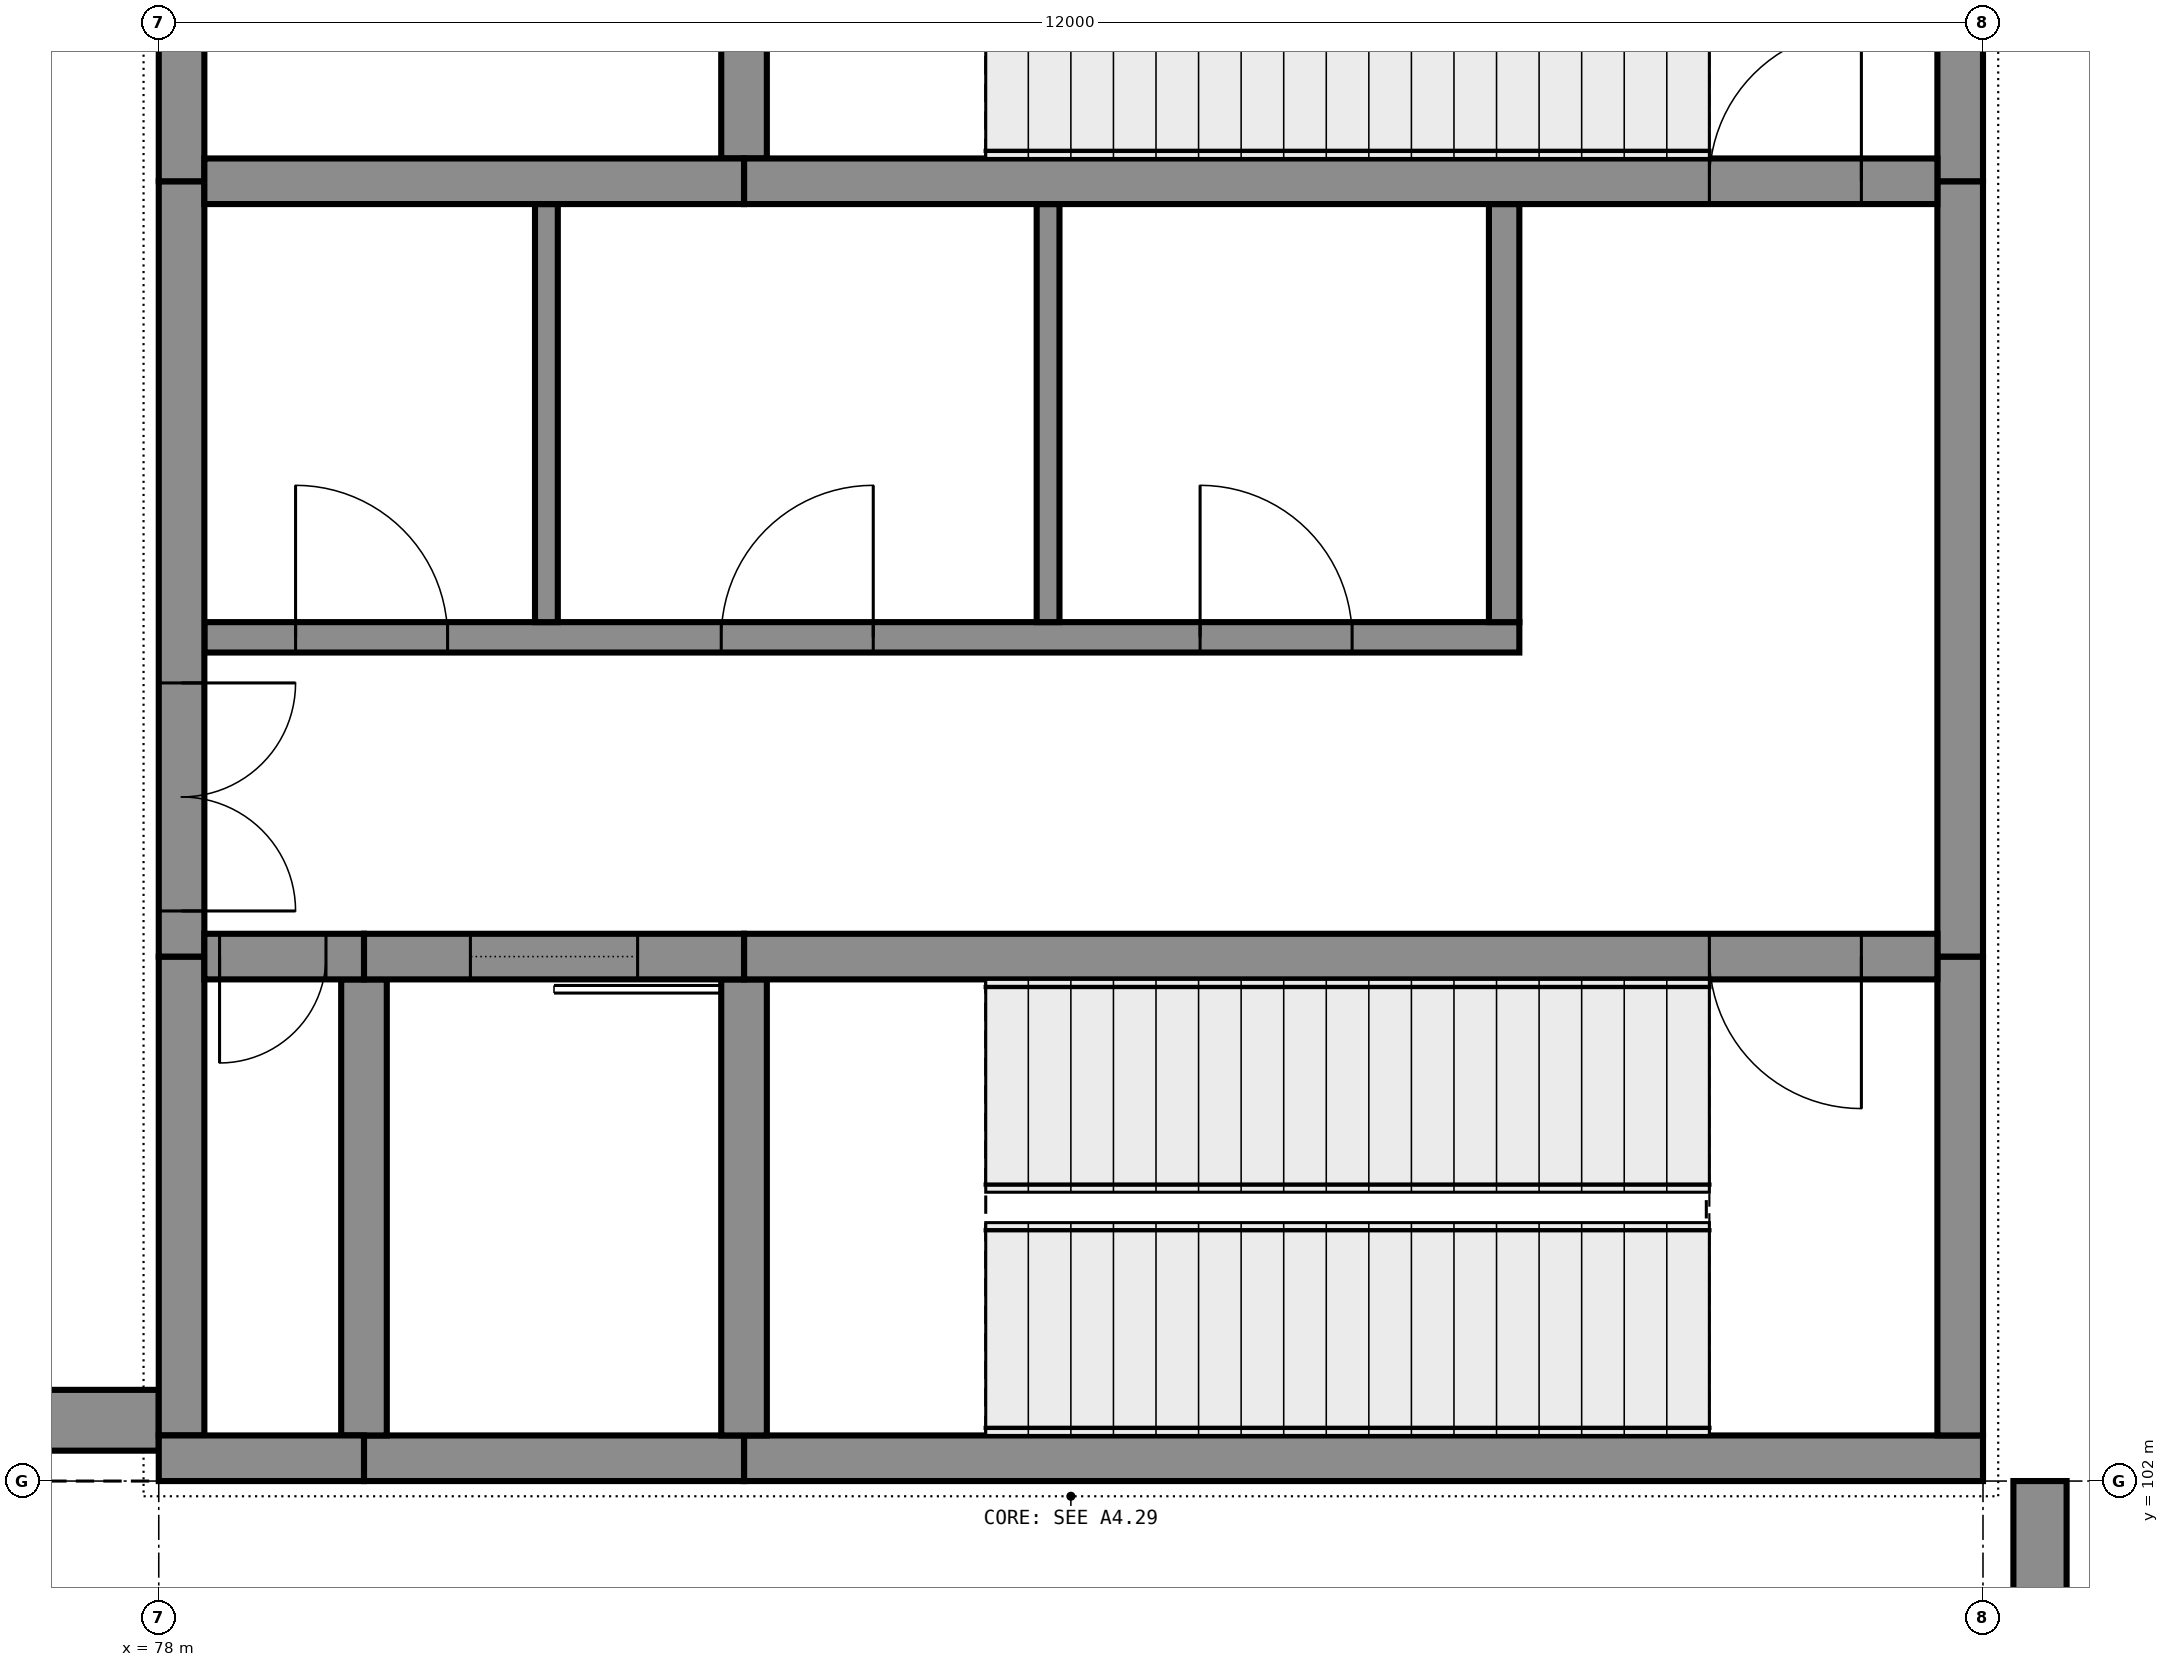
"""IFC4 building model, lengths in metres.
Left out: names, types, materials, properties, quantities, classifications, styles, units other than length and angle.
Written with IfcOpenShell. Run it as: python <this file> out.ifc"""

import sys

from ifc_helpers import new_model, si_unit, direction, frame, frame_2d, origin, place, context, subcontext, project, spatial, rectangle, extrude, element, fill, save


model = new_model("IFC4")
c1 = context("Model", 3, precision=1e-05, world=origin(), true_north=direction((0.0, 1.0)))
c2 = subcontext(c1, "Body", "Model", "MODEL_VIEW")
j1 = project(units=[si_unit("LENGTHUNIT", "METRE"), si_unit("PLANEANGLEUNIT", "RADIAN")], contexts=[c1])
p1 = place(None, origin())
s1 = spatial("IfcSite", under=j1, at=p1, CompositionType="ELEMENT")
p2 = place(p1, origin())
s2 = spatial("IfcBuilding", under=s1, at=p2, CompositionType="ELEMENT")
p3 = place(p2, frame((0.0, 0.0, 6.0)))
s3 = spatial("IfcBuildingStorey", under=s2, at=p3, CompositionType="ELEMENT", Elevation=6.0)
p4 = place(p3, frame((90.0, 102.15, 0.0), z_axis=(0.0, 0.0, 1.0), x_axis=(-1.0, 0.0, 0.0)))
e1 = element("IfcWall", 1, at=p4, inside=s3, PredefinedType="SHEAR", context=c2, shape_type="SweptSolid", body=[
    extrude(rectangle(XDim=8.15, YDim=0.3, at=frame_2d((4.075, 0.0))), origin(), (0.0, 0.0, 1.0), 5.75),
])
p5 = place(p3, frame((81.85, 102.15, 0.0), z_axis=(0.0, 0.0, 1.0), x_axis=(-1.0, 0.0, 0.0)))
e2 = element("IfcWall", 2, at=p5, inside=s3, PredefinedType="SHEAR", context=c2, shape_type="SweptSolid", body=[
    extrude(rectangle(XDim=2.5, YDim=0.3, at=frame_2d((1.25, 0.0))), origin(), (0.0, 0.0, 1.0), 5.75),
])
p6 = place(p3, frame((79.35, 102.15, 0.0), z_axis=(0.0, 0.0, 1.0), x_axis=(-1.0, 0.0, 0.0)))
e3 = element("IfcWall", 3, at=p6, inside=s3, PredefinedType="SHEAR", context=c2, shape_type="SweptSolid", body=[
    extrude(rectangle(XDim=1.35, YDim=0.3, at=frame_2d((0.675, 0.0))), origin(), (0.0, 0.0, 1.0), 5.75),
])
p7 = place(p3, frame((89.7, 105.45, 0.0), z_axis=(0.0, 0.0, 1.0), x_axis=(-1.0, 0.0, 0.0)))
e4 = element("IfcWall", 4, at=p7, inside=s3, PredefinedType="SHEAR", context=c2, shape_type="SweptSolid", body=[
    extrude(rectangle(XDim=7.85, YDim=0.3, at=frame_2d((3.925, 0.0))), origin(), (0.0, 0.0, 1.0), 5.75),
])
p8 = place(p7, frame((0.5, 0.0, 0.0)))
e5 = element("IfcOpeningElement", 5, at=p8, cuts=e4, PredefinedType="OPENING", context=c2, shape_type="SweptSolid", body=[
    extrude(rectangle(XDim=1.0, YDim=2.1, at=frame_2d((0.5, 1.05))), frame((0.0, 0.16, 0.0), z_axis=(0.0, -1.0, 0.0), x_axis=(1.0, 0.0, 0.0)), (0.0, 0.0, 1.0), 0.32),
])
p9 = place(p3, frame((81.85, 105.45, 0.0), z_axis=(0.0, 0.0, 1.0), x_axis=(-1.0, 0.0, 0.0)))
e6 = element("IfcWall", 6, at=p9, inside=s3, PredefinedType="SHEAR", context=c2, shape_type="SweptSolid", body=[
    extrude(rectangle(XDim=2.5, YDim=0.3, at=frame_2d((1.25, 0.0))), origin(), (0.0, 0.0, 1.0), 5.75),
])
p10 = place(p9, frame((0.7, 0.0, 0.0)))
e7 = element("IfcOpeningElement", 7, at=p10, cuts=e6, PredefinedType="OPENING", context=c2, shape_type="SweptSolid", body=[
    extrude(rectangle(XDim=1.1, YDim=2.1, at=frame_2d((0.55, 1.05))), frame((0.0, 0.16, 0.0), z_axis=(0.0, -1.0, 0.0), x_axis=(1.0, 0.0, 0.0)), (0.0, 0.0, 1.0), 0.32),
])
p11 = place(p3, frame((79.35, 105.45, 0.0), z_axis=(0.0, 0.0, 1.0), x_axis=(-1.0, 0.0, 0.0)))
e8 = element("IfcWall", 8, at=p11, inside=s3, PredefinedType="SHEAR", context=c2, shape_type="SweptSolid", body=[
    extrude(rectangle(XDim=1.05, YDim=0.3, at=frame_2d((0.525, 0.0))), origin(), (0.0, 0.0, 1.0), 5.75),
])
p12 = place(p11, frame((0.25, 0.0, 0.0)))
e9 = element("IfcOpeningElement", 9, at=p12, cuts=e8, PredefinedType="OPENING", context=c2, shape_type="SweptSolid", body=[
    extrude(rectangle(XDim=0.7, YDim=2.1, at=frame_2d((0.35, 1.05))), frame((0.0, 0.16, 0.0), z_axis=(0.0, -1.0, 0.0), x_axis=(1.0, 0.0, 0.0)), (0.0, 0.0, 1.0), 0.32),
])
p13 = place(p3, frame((89.7, 110.55, 0.0), z_axis=(0.0, 0.0, 1.0), x_axis=(-1.0, 0.0, 0.0)))
e10 = element("IfcWall", 10, at=p13, inside=s3, PredefinedType="SHEAR", context=c2, shape_type="SweptSolid", body=[
    extrude(rectangle(XDim=7.85, YDim=0.3, at=frame_2d((3.925, 0.0))), origin(), (0.0, 0.0, 1.0), 5.75),
])
p14 = place(p13, frame((0.5, 0.0, 0.0)))
e11 = element("IfcOpeningElement", 11, at=p14, cuts=e10, PredefinedType="OPENING", context=c2, shape_type="SweptSolid", body=[
    extrude(rectangle(XDim=1.0, YDim=2.1, at=frame_2d((0.5, 1.05))), frame((0.0, 0.16, 0.0), z_axis=(0.0, -1.0, 0.0), x_axis=(1.0, 0.0, 0.0)), (0.0, 0.0, 1.0), 0.32),
])
p15 = place(p3, frame((81.85, 110.55, 0.0), z_axis=(0.0, 0.0, 1.0), x_axis=(-1.0, 0.0, 0.0)))
e12 = element("IfcWall", 12, at=p15, inside=s3, PredefinedType="SHEAR", context=c2, shape_type="SweptSolid", body=[
    extrude(rectangle(XDim=3.55, YDim=0.3, at=frame_2d((1.775, 0.0))), origin(), (0.0, 0.0, 1.0), 5.75),
])
p16 = place(p3, frame((89.85, 102.3, 0.0), z_axis=(0.0, 0.0, 1.0), x_axis=(0.0, 1.0, 0.0)))
e13 = element("IfcWall", 13, at=p16, inside=s3, PredefinedType="SHEAR", context=c2, shape_type="SweptSolid", body=[
    extrude(rectangle(XDim=3.15, YDim=0.3, at=frame_2d((1.575, 0.0))), origin(), (0.0, 0.0, 1.0), 5.75),
])
p17 = place(p3, frame((89.85, 105.45, 0.0), z_axis=(0.0, 0.0, 1.0), x_axis=(0.0, 1.0, 0.0)))
e14 = element("IfcWall", 14, at=p17, inside=s3, PredefinedType="SHEAR", context=c2, shape_type="SweptSolid", body=[
    extrude(rectangle(XDim=5.1, YDim=0.3, at=frame_2d((2.55, 0.0))), origin(), (0.0, 0.0, 1.0), 5.75),
])
p18 = place(p3, frame((89.85, 110.55, 0.0), z_axis=(0.0, 0.0, 1.0), x_axis=(0.0, 1.0, 0.0)))
e15 = element("IfcWall", 15, at=p18, inside=s3, PredefinedType="SHEAR", context=c2, shape_type="SweptSolid", body=[
    extrude(rectangle(XDim=3.45, YDim=0.3, at=frame_2d((1.725, 0.0))), origin(), (0.0, 0.0, 1.0), 5.75),
])
p19 = place(p3, frame((78.15, 102.3, 0.0), z_axis=(0.0, 0.0, 1.0), x_axis=(0.0, 1.0, 0.0)))
e16 = element("IfcWall", 16, at=p19, inside=s3, PredefinedType="SHEAR", context=c2, shape_type="SweptSolid", body=[
    extrude(rectangle(XDim=3.15, YDim=0.3, at=frame_2d((1.575, 0.0))), origin(), (0.0, 0.0, 1.0), 5.75),
])
p20 = place(p3, frame((78.15, 105.45, 0.0), z_axis=(0.0, 0.0, 1.0), x_axis=(0.0, 1.0, 0.0)))
e17 = element("IfcWall", 17, at=p20, inside=s3, PredefinedType="SHEAR", context=c2, shape_type="SweptSolid", body=[
    extrude(rectangle(XDim=5.1, YDim=0.3, at=frame_2d((2.55, 0.0))), origin(), (0.0, 0.0, 1.0), 5.75),
])
p21 = place(p20, frame((0.3, 0.0, 0.0)))
e18 = element("IfcOpeningElement", 18, at=p21, cuts=e17, PredefinedType="OPENING", context=c2, shape_type="SweptSolid", body=[
    extrude(rectangle(XDim=1.5, YDim=2.1, at=frame_2d((0.75, 1.05))), frame((0.0, 0.16, 0.0), z_axis=(0.0, -1.0, 0.0), x_axis=(1.0, 0.0, 0.0)), (0.0, 0.0, 1.0), 0.32),
])
p22 = place(p3, frame((78.15, 110.55, 0.0), z_axis=(0.0, 0.0, 1.0), x_axis=(0.0, 1.0, 0.0)))
e19 = element("IfcWall", 19, at=p22, inside=s3, PredefinedType="SHEAR", context=c2, shape_type="SweptSolid", body=[
    extrude(rectangle(XDim=3.15, YDim=0.3, at=frame_2d((1.575, 0.0))), origin(), (0.0, 0.0, 1.0), 5.75),
])
p23 = place(p22, frame((1.15, 0.0, 0.0)))
e20 = element("IfcOpeningElement", 20, at=p23, cuts=e19, PredefinedType="OPENING", context=c2, shape_type="SweptSolid", body=[
    extrude(rectangle(XDim=1.0, YDim=2.1, at=frame_2d((0.5, 1.05))), frame((0.0, 0.16, 0.0), z_axis=(0.0, -1.0, 0.0), x_axis=(1.0, 0.0, 0.0)), (0.0, 0.0, 1.0), 0.32),
])
p24 = place(p3, frame((81.85, 102.3, 0.0), z_axis=(0.0, 0.0, 1.0), x_axis=(0.0, 1.0, 0.0)))
e21 = element("IfcWall", 21, at=p24, inside=s3, PredefinedType="SHEAR", context=c2, shape_type="SweptSolid", body=[
    extrude(rectangle(XDim=3.0, YDim=0.3, at=frame_2d((1.5, 0.0))), origin(), (0.0, 0.0, 1.0), 5.75),
])
p25 = place(p3, frame((81.85, 110.7, 0.0), z_axis=(0.0, 0.0, 1.0), x_axis=(0.0, 1.0, 0.0)))
e22 = element("IfcWall", 22, at=p25, inside=s3, PredefinedType="SHEAR", context=c2, shape_type="SweptSolid", body=[
    extrude(rectangle(XDim=3.3, YDim=0.3, at=frame_2d((1.65, 0.0))), origin(), (0.0, 0.0, 1.0), 5.75),
])
p26 = place(p3, frame((79.35, 102.3, 0.0), z_axis=(0.0, 0.0, 1.0), x_axis=(0.0, 1.0, 0.0)))
e23 = element("IfcWall", 23, at=p26, inside=s3, PredefinedType="SHEAR", context=c2, shape_type="SweptSolid", body=[
    extrude(rectangle(XDim=3.0, YDim=0.3, at=frame_2d((1.5, 0.0))), origin(), (0.0, 0.0, 1.0), 5.75),
])
p27 = place(p3, frame((90.375, 90.5, 0.0), z_axis=(0.0, 0.0, 1.0), x_axis=(0.0, 1.0, 0.0)))
e24 = element("IfcWall", 24, at=p27, inside=s3, PredefinedType="STANDARD", context=c2, shape_type="SweptSolid", body=[
    extrude(rectangle(XDim=11.5, YDim=0.35, at=frame_2d((5.75, 0.0))), origin(), (0.0, 0.0, 1.0), 6.0),
])
p28 = place(p3, frame((66.5, 102.4, 0.0), z_axis=(0.0, 0.0, 1.0), x_axis=(1.0, 0.0, 0.0)))
e25 = element("IfcWall", 25, at=p28, inside=s3, PredefinedType="SOLIDWALL", context=c2, shape_type="SweptSolid", body=[
    extrude(rectangle(XDim=11.5, YDim=0.4, at=frame_2d((5.75, 0.0))), origin(), (0.0, 0.0, 1.0), 6.0),
])
p29 = place(p3, frame((78.3, 107.55, 0.0), z_axis=(0.0, 0.0, 1.0), x_axis=(1.0, 0.0, 0.0)))
e26 = element("IfcWall", 26, at=p29, inside=s3, PredefinedType="PARTITIONING", context=c2, shape_type="SweptSolid", body=[
    extrude(rectangle(XDim=8.65, YDim=0.2, at=frame_2d((4.325, 0.0))), origin(), (0.0, 0.0, 1.0), 5.75),
])
p30 = place(p29, frame((0.6, 0.0, 0.0)))
e27 = element("IfcOpeningElement", 27, at=p30, cuts=e26, PredefinedType="OPENING", context=c2, shape_type="SweptSolid", body=[
    extrude(rectangle(XDim=1.0, YDim=2.1, at=frame_2d((0.5, 1.05))), frame((0.0, 0.11, 0.0), z_axis=(0.0, -1.0, 0.0), x_axis=(1.0, 0.0, 0.0)), (0.0, 0.0, 1.0), 0.22),
])
p31 = place(p29, frame((3.4, 0.0, 0.0)))
e28 = element("IfcOpeningElement", 28, at=p31, cuts=e26, PredefinedType="OPENING", context=c2, shape_type="SweptSolid", body=[
    extrude(rectangle(XDim=1.0, YDim=2.1, at=frame_2d((0.5, 1.05))), frame((0.0, 0.11, 0.0), z_axis=(0.0, -1.0, 0.0), x_axis=(1.0, 0.0, 0.0)), (0.0, 0.0, 1.0), 0.22),
])
p32 = place(p29, frame((6.55, 0.0, 0.0)))
e29 = element("IfcOpeningElement", 29, at=p32, cuts=e26, PredefinedType="OPENING", context=c2, shape_type="SweptSolid", body=[
    extrude(rectangle(XDim=1.0, YDim=2.1, at=frame_2d((0.5, 1.05))), frame((0.0, 0.11, 0.0), z_axis=(0.0, -1.0, 0.0), x_axis=(1.0, 0.0, 0.0)), (0.0, 0.0, 1.0), 0.22),
])
for number, where, z_axis, x_axis in (
    (30, (80.55, 107.65, 0.0), (0.0, 0.0, 1.0), (0.0, 1.0, 0.0)),
    (31, (83.85, 107.65, 0.0), (0.0, 0.0, 1.0), (0.0, 1.0, 0.0)),
):
    element("IfcWall", number, at=place(p3, frame(where, z_axis=z_axis, x_axis=x_axis)), inside=s3, PredefinedType="PARTITIONING", context=c2, shape_type="SweptSolid", body=[
        extrude(rectangle(XDim=2.75, YDim=0.15, at=frame_2d((1.375, 0.0))), origin(), (0.0, 0.0, 1.0), 5.75),
    ])
p33 = place(p3, frame((86.85, 107.65, 0.0), z_axis=(0.0, 0.0, 1.0), x_axis=(0.0, 1.0, 0.0)))
e32 = element("IfcWall", 32, at=p33, inside=s3, PredefinedType="PARTITIONING", context=c2, shape_type="SweptSolid", body=[
    extrude(rectangle(XDim=2.75, YDim=0.2, at=frame_2d((1.375, 0.0))), origin(), (0.0, 0.0, 1.0), 5.75),
])
p34 = place(p12, origin())
e33 = element("IfcDoor", 33, at=p34, inside=s3, OperationType="SINGLE_SWING_LEFT", PredefinedType="DOOR", context=c2, shape_type="SweptSolid", body=[
    extrude(rectangle(XDim=0.7, YDim=2.1, at=frame_2d((0.35, 1.05))), frame((0.0, 0.025, 0.0), z_axis=(0.0, -1.0, 0.0), x_axis=(1.0, 0.0, 0.0)), (0.0, 0.0, 1.0), 0.05),
])
fill(e9, e33)
p35 = place(p10, origin())
e34 = element("IfcDoor", 34, at=p35, inside=s3, OperationType="SLIDING_TO_LEFT", PredefinedType="DOOR", context=c2, shape_type="SweptSolid", body=[
    extrude(rectangle(XDim=1.1, YDim=2.1, at=frame_2d((0.55, 1.05))), frame((0.0, 0.025, 0.0), z_axis=(0.0, -1.0, 0.0), x_axis=(1.0, 0.0, 0.0)), (0.0, 0.0, 1.0), 0.05),
])
fill(e7, e34)
p36 = place(p8, origin())
e35 = element("IfcDoor", 35, at=p36, inside=s3, OperationType="SINGLE_SWING_RIGHT", PredefinedType="DOOR", context=c2, shape_type="SweptSolid", body=[
    extrude(rectangle(XDim=1.0, YDim=2.1, at=frame_2d((0.5, 1.05))), frame((0.0, 0.025, 0.0), z_axis=(0.0, -1.0, 0.0), x_axis=(1.0, 0.0, 0.0)), (0.0, 0.0, 1.0), 0.05),
])
fill(e5, e35)
p37 = place(p21, frame((1.5, 0.0, 0.0), z_axis=(0.0, 0.0, 1.0), x_axis=(-1.0, 0.0, 0.0)))
e36 = element("IfcDoor", 36, at=p37, inside=s3, OperationType="DOUBLE_DOOR_SINGLE_SWING", PredefinedType="DOOR", context=c2, shape_type="SweptSolid", body=[
    extrude(rectangle(XDim=1.5, YDim=2.1, at=frame_2d((0.75, 1.05))), frame((0.0, 0.025, 0.0), z_axis=(0.0, -1.0, 0.0), x_axis=(1.0, 0.0, 0.0)), (0.0, 0.0, 1.0), 0.05),
])
fill(e18, e36)
p38 = place(p30, origin())
e37 = element("IfcDoor", 37, at=p38, inside=s3, OperationType="SINGLE_SWING_RIGHT", PredefinedType="DOOR", context=c2, shape_type="SweptSolid", body=[
    extrude(rectangle(XDim=1.0, YDim=2.1, at=frame_2d((0.5, 1.05))), frame((0.0, 0.025, 0.0), z_axis=(0.0, -1.0, 0.0), x_axis=(1.0, 0.0, 0.0)), (0.0, 0.0, 1.0), 0.05),
])
fill(e27, e37)
p39 = place(p31, origin())
e38 = element("IfcDoor", 38, at=p39, inside=s3, OperationType="SINGLE_SWING_LEFT", PredefinedType="DOOR", context=c2, shape_type="SweptSolid", body=[
    extrude(rectangle(XDim=1.0, YDim=2.1, at=frame_2d((0.5, 1.05))), frame((0.0, 0.025, 0.0), z_axis=(0.0, -1.0, 0.0), x_axis=(1.0, 0.0, 0.0)), (0.0, 0.0, 1.0), 0.05),
])
fill(e28, e38)
p40 = place(p32, origin())
e39 = element("IfcDoor", 39, at=p40, inside=s3, OperationType="SINGLE_SWING_RIGHT", PredefinedType="DOOR", context=c2, shape_type="SweptSolid", body=[
    extrude(rectangle(XDim=1.0, YDim=2.1, at=frame_2d((0.5, 1.05))), frame((0.0, 0.025, 0.0), z_axis=(0.0, -1.0, 0.0), x_axis=(1.0, 0.0, 0.0)), (0.0, 0.0, 1.0), 0.05),
])
fill(e29, e39)
p41 = place(p14, frame((1.0, 0.0, 0.0), z_axis=(0.0, 0.0, 1.0), x_axis=(-1.0, 0.0, 0.0)))
e40 = element("IfcDoor", 40, at=p41, inside=s3, OperationType="SINGLE_SWING_LEFT", PredefinedType="DOOR", context=c2, shape_type="SweptSolid", body=[
    extrude(rectangle(XDim=1.0, YDim=2.1, at=frame_2d((0.5, 1.05))), frame((0.0, 0.025, 0.0), z_axis=(0.0, -1.0, 0.0), x_axis=(1.0, 0.0, 0.0)), (0.0, 0.0, 1.0), 0.05),
])
fill(e11, e40)
save(model, sys.argv[1])
